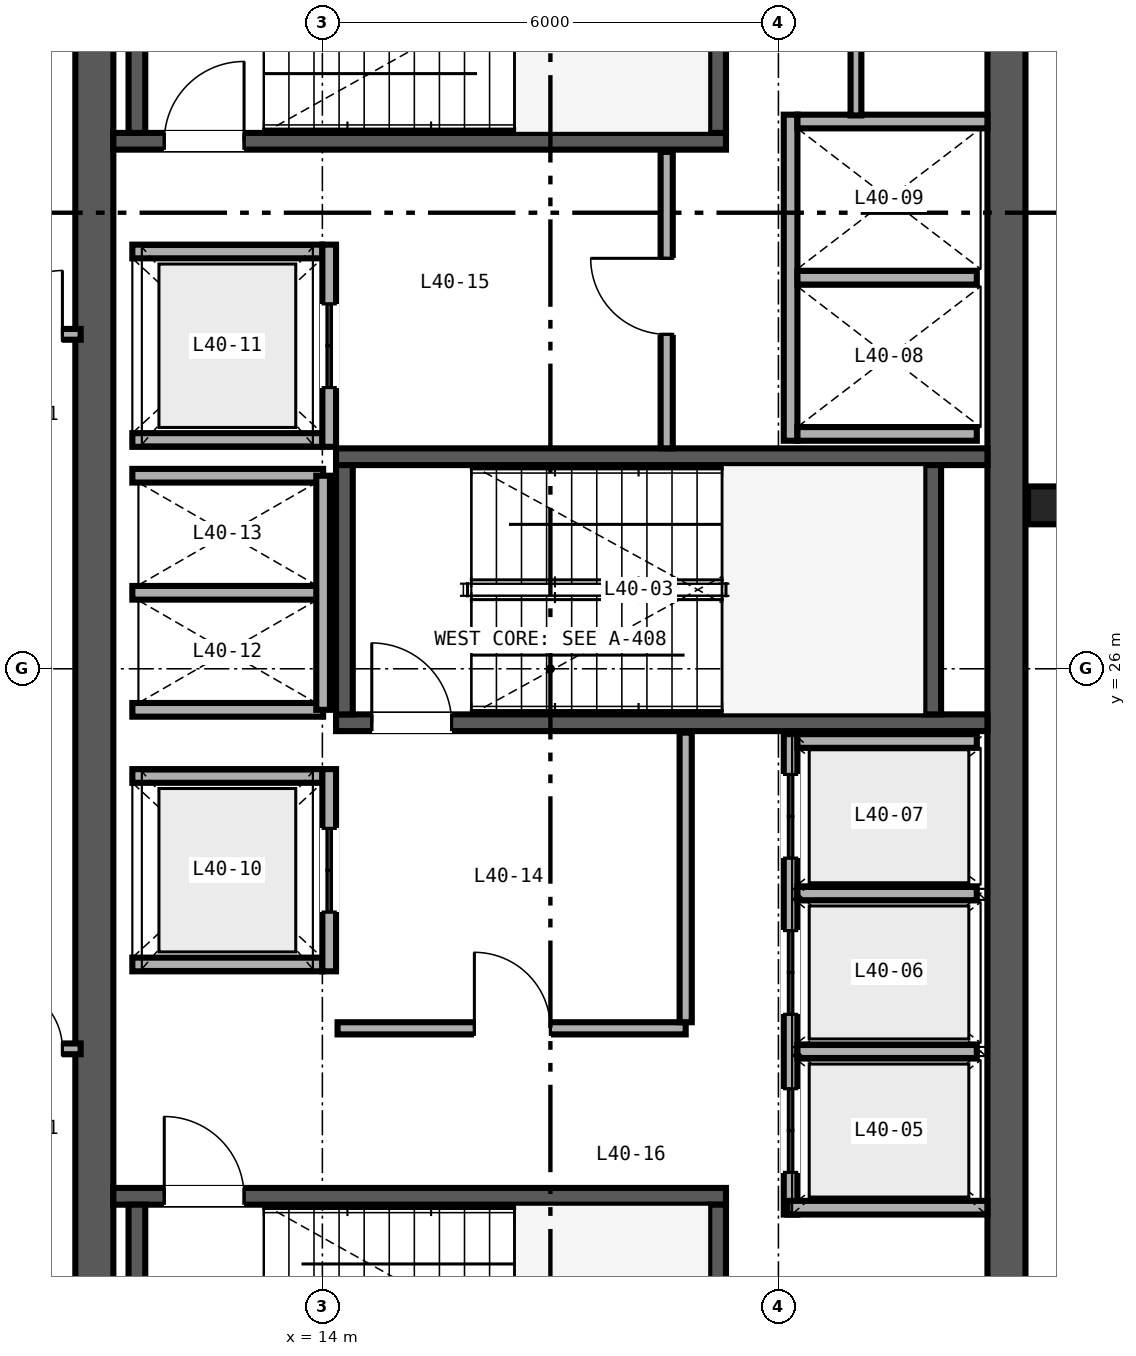
"""IFC4 building model, lengths in metres.
Left out: names, types, materials, properties, quantities, classifications, styles, units other than length and angle.
Written with IfcOpenShell. Run it as: python <this file> out.ifc"""

import sys

from ifc_helpers import new_model, si_unit, direction, frame, frame_2d, origin, origin_2d, place, context, subcontext, project, spatial, rectangle, i_section, extrude, source, transform, mapped, element, fill, save


model = new_model("IFC4")
c1 = context("Model", 3, precision=1e-05, world=origin(), true_north=direction((0.0, 1.0)))
c2 = subcontext(c1, "Body", "Model", "MODEL_VIEW")
j1 = project(units=[si_unit("LENGTHUNIT", "METRE"), si_unit("PLANEANGLEUNIT", "RADIAN")], contexts=[c1])
p1 = place(None, origin())
s1 = spatial("IfcSite", under=j1, at=p1, CompositionType="ELEMENT")
p2 = place(p1, origin())
s2 = spatial("IfcBuilding", under=s1, at=p2, CompositionType="ELEMENT")
p3 = place(p2, frame((0.0, 0.0, 163.2)))
s3 = spatial("IfcBuildingStorey", under=s2, at=p3, CompositionType="ELEMENT", Elevation=163.2)
for number, where, z_axis, x_axis in (
    (1, (11.0, 15.25, 0.0), (0.0, 0.0, 1.0), (0.0, 1.0, 0.0)),
    (2, (23.0, 15.25, 0.0), (0.0, 0.0, 1.0), (0.0, 1.0, 0.0)),
):
    element("IfcWall", number, at=place(p3, frame(where, z_axis=z_axis, x_axis=x_axis)), inside=s3, PredefinedType="SHEAR", context=c2, shape_type="SweptSolid", body=[
        extrude(rectangle(XDim=21.5, YDim=0.5, at=frame_2d((10.75, 0.0))), origin(), (0.0, 0.0, 1.0), 3.37),
    ])
p4 = place(p3, frame((11.25, 19.06, 0.0), z_axis=(0.0, 0.0, 1.0), x_axis=(1.0, 0.0, 0.0)))
e3 = element("IfcWall", 3, at=p4, inside=s3, PredefinedType="SHEAR", context=c2, shape_type="SweptSolid", body=[
    extrude(rectangle(XDim=8.06, YDim=0.22, at=frame_2d((4.03, 0.0))), origin(), (0.0, 0.0, 1.0), 3.4),
])
p5 = place(p4, frame((0.67, 0.0, 0.0)))
e4 = element("IfcOpeningElement", 4, at=p5, cuts=e3, PredefinedType="OPENING", context=c2, shape_type="SweptSolid", body=[
    extrude(rectangle(XDim=1.05, YDim=2.15, at=frame_2d((0.525, 1.075))), frame((0.0, 0.12, 0.0), z_axis=(0.0, -1.0, 0.0), x_axis=(1.0, 0.0, 0.0)), (0.0, 0.0, 1.0), 0.24),
])
for number, where, z_axis, x_axis in (
    (5, (11.56, 15.67, 0.0), (0.0, 0.0, 1.0), (0.0, 1.0, 0.0)),
    (6, (19.2, 15.67, 0.0), (0.0, 0.0, 1.0), (0.0, 1.0, 0.0)),
):
    element("IfcWall", number, at=place(p3, frame(where, z_axis=z_axis, x_axis=x_axis)), inside=s3, PredefinedType="SHEAR", context=c2, shape_type="SweptSolid", body=[
        extrude(rectangle(XDim=3.28, YDim=0.22, at=frame_2d((1.64, 0.0))), origin(), (0.0, 0.0, 1.0), 3.4),
    ])
p6 = place(p3, frame((11.25, 32.94, 0.0), z_axis=(0.0, 0.0, 1.0), x_axis=(1.0, 0.0, 0.0)))
e7 = element("IfcWall", 7, at=p6, inside=s3, PredefinedType="SHEAR", context=c2, shape_type="SweptSolid", body=[
    extrude(rectangle(XDim=8.06, YDim=0.22, at=frame_2d((4.03, 0.0))), origin(), (0.0, 0.0, 1.0), 3.4),
])
p7 = place(p6, frame((0.67, 0.0, 0.0)))
e8 = element("IfcOpeningElement", 8, at=p7, cuts=e7, PredefinedType="OPENING", context=c2, shape_type="SweptSolid", body=[
    extrude(rectangle(XDim=1.05, YDim=2.15, at=frame_2d((0.525, 1.075))), frame((0.0, 0.12, 0.0), z_axis=(0.0, -1.0, 0.0), x_axis=(1.0, 0.0, 0.0)), (0.0, 0.0, 1.0), 0.24),
])
for number, where, z_axis, x_axis in (
    (9, (11.56, 33.05, 0.0), (0.0, 0.0, 1.0), (0.0, 1.0, 0.0)),
    (10, (19.2, 33.05, 0.0), (0.0, 0.0, 1.0), (0.0, 1.0, 0.0)),
):
    element("IfcWall", number, at=place(p3, frame(where, z_axis=z_axis, x_axis=x_axis)), inside=s3, PredefinedType="SHEAR", context=c2, shape_type="SweptSolid", body=[
        extrude(rectangle(XDim=3.28, YDim=0.22, at=frame_2d((1.64, 0.0))), origin(), (0.0, 0.0, 1.0), 3.4),
    ])
p8 = place(p3, frame((14.18, 25.29, 0.0), z_axis=(0.0, 0.0, 1.0), x_axis=(1.0, 0.0, 0.0)))
e11 = element("IfcWall", 11, at=p8, inside=s3, PredefinedType="SHEAR", context=c2, shape_type="SweptSolid", body=[
    extrude(rectangle(XDim=8.57, YDim=0.22, at=frame_2d((4.285, 0.0))), origin(), (0.0, 0.0, 1.0), 3.4),
])
p9 = place(p8, frame((0.47, 0.0, 0.0)))
e12 = element("IfcOpeningElement", 12, at=p9, cuts=e11, PredefinedType="OPENING", context=c2, shape_type="SweptSolid", body=[
    extrude(rectangle(XDim=1.05, YDim=2.15, at=frame_2d((0.525, 1.075))), frame((0.0, 0.12, 0.0), z_axis=(0.0, -1.0, 0.0), x_axis=(1.0, 0.0, 0.0)), (0.0, 0.0, 1.0), 0.24),
])
p10 = place(p3, frame((14.18, 28.79, 0.0), z_axis=(0.0, 0.0, 1.0), x_axis=(1.0, 0.0, 0.0)))
e13 = element("IfcWall", 13, at=p10, inside=s3, PredefinedType="SHEAR", context=c2, shape_type="SweptSolid", body=[
    extrude(rectangle(XDim=8.57, YDim=0.22, at=frame_2d((4.285, 0.0))), origin(), (0.0, 0.0, 1.0), 3.4),
])
for number, where, z_axis, x_axis in (
    (14, (14.29, 25.4, 0.0), (0.0, 0.0, 1.0), (0.0, 1.0, 0.0)),
    (15, (22.03, 25.4, 0.0), (0.0, 0.0, 1.0), (0.0, 1.0, 0.0)),
):
    element("IfcWall", number, at=place(p3, frame(where, z_axis=z_axis, x_axis=x_axis)), inside=s3, PredefinedType="SHEAR", context=c2, shape_type="SweptSolid", body=[
        extrude(rectangle(XDim=3.28, YDim=0.22, at=frame_2d((1.64, 0.0))), origin(), (0.0, 0.0, 1.0), 3.4),
    ])
m1 = source(origin(), c2, "Body", "SweptSolid", [
    extrude(i_section(OverallWidth=0.432, OverallDepth=0.498, WebThickness=0.056, FlangeThickness=0.089, FilletRadius=0.025, at=origin_2d()), origin(), (0.0, 0.0, 1.0), 3.37),
])
p11 = place(p3, frame((23.5, 28.15, 0.0), z_axis=(0.0, 0.0, 1.0), x_axis=(1.0, 0.0, 0.0)))
e16 = element("IfcColumn", 16, at=p11, inside=s3, PredefinedType="COLUMN", context=c2, shape_type="MappedRepresentation", body=[
    mapped(m1, transform((0.0, 0.0, 0.0), scale=1.0)),
])
p12 = place(p3, frame((20.16, 18.82, 0.0), z_axis=(0.0, 0.0, 1.0), x_axis=(0.0, 1.0, 0.0)))
e17 = element("IfcWall", 17, at=p12, inside=s3, PredefinedType="SOLIDWALL", context=c2, shape_type="SweptSolid", body=[
    extrude(rectangle(XDim=6.32, YDim=0.18, at=frame_2d((3.16, 0.0))), origin(), (0.0, 0.0, 1.0), 2.47),
])
p13 = place(p12, frame((0.555, 0.0, 0.0)))
e18 = element("IfcOpeningElement", 18, at=p13, cuts=e17, PredefinedType="OPENING", context=c2, shape_type="SweptSolid", body=[
    extrude(rectangle(XDim=1.1, YDim=2.2, at=frame_2d((0.55, 1.1))), frame((0.0, 0.1, 0.0), z_axis=(0.0, -1.0, 0.0), x_axis=(1.0, 0.0, 0.0)), (0.0, 0.0, 1.0), 0.2),
])
p14 = place(p12, frame((2.635, 0.0, 0.0)))
e19 = element("IfcOpeningElement", 19, at=p14, cuts=e17, PredefinedType="OPENING", context=c2, shape_type="SweptSolid", body=[
    extrude(rectangle(XDim=1.1, YDim=2.2, at=frame_2d((0.55, 1.1))), frame((0.0, 0.1, 0.0), z_axis=(0.0, -1.0, 0.0), x_axis=(1.0, 0.0, 0.0)), (0.0, 0.0, 1.0), 0.2),
])
p15 = place(p12, frame((4.69, 0.0, 0.0)))
e20 = element("IfcOpeningElement", 20, at=p15, cuts=e17, PredefinedType="OPENING", context=c2, shape_type="SweptSolid", body=[
    extrude(rectangle(XDim=1.1, YDim=2.2, at=frame_2d((0.55, 1.1))), frame((0.0, 0.1, 0.0), z_axis=(0.0, -1.0, 0.0), x_axis=(1.0, 0.0, 0.0)), (0.0, 0.0, 1.0), 0.2),
])
p16 = place(p3, frame((20.12, 18.91, 0.0), z_axis=(0.0, 0.0, 1.0), x_axis=(1.0, 0.0, 0.0)))
e21 = element("IfcWall", 21, at=p16, inside=s3, PredefinedType="SOLIDWALL", context=c2, shape_type="SweptSolid", body=[
    extrude(rectangle(XDim=2.63, YDim=0.18, at=frame_2d((1.315, 0.0))), origin(), (0.0, 0.0, 1.0), 3.37),
])
p17 = place(p3, frame((20.25, 25.05, 0.0), z_axis=(0.0, 0.0, 1.0), x_axis=(1.0, 0.0, 0.0)))
e22 = element("IfcWall", 22, at=p17, inside=s3, PredefinedType="SOLIDWALL", context=c2, shape_type="SweptSolid", body=[
    extrude(rectangle(XDim=2.36, YDim=0.18, at=frame_2d((1.18, 0.0))), origin(), (0.0, 0.0, 1.0), 3.37),
])
p18 = place(p3, frame((20.25, 20.965, 0.0), z_axis=(0.0, 0.0, 1.0), x_axis=(1.0, 0.0, 0.0)))
e23 = element("IfcWall", 23, at=p18, inside=s3, PredefinedType="SOLIDWALL", context=c2, shape_type="SweptSolid", body=[
    extrude(rectangle(XDim=2.36, YDim=0.18, at=frame_2d((1.18, 0.0))), origin(), (0.0, 0.0, 1.0), 2.47),
])
p19 = place(p3, frame((20.25, 23.045, 0.0), z_axis=(0.0, 0.0, 1.0), x_axis=(1.0, 0.0, 0.0)))
e24 = element("IfcWall", 24, at=p19, inside=s3, PredefinedType="SOLIDWALL", context=c2, shape_type="SweptSolid", body=[
    extrude(rectangle(XDim=2.36, YDim=0.18, at=frame_2d((1.18, 0.0))), origin(), (0.0, 0.0, 1.0), 3.37),
])
p20 = place(p3, frame((20.16, 29.0, 0.0), z_axis=(0.0, 0.0, 1.0), x_axis=(0.0, 1.0, 0.0)))
e25 = element("IfcWall", 25, at=p20, inside=s3, PredefinedType="SOLIDWALL", context=c2, shape_type="SweptSolid", body=[
    extrude(rectangle(XDim=4.29, YDim=0.18, at=frame_2d((2.145, 0.0))), origin(), (0.0, 0.0, 1.0), 3.37),
])
p21 = place(p3, frame((20.25, 29.09, 0.0), z_axis=(0.0, 0.0, 1.0), x_axis=(1.0, 0.0, 0.0)))
e26 = element("IfcWall", 26, at=p21, inside=s3, PredefinedType="SOLIDWALL", context=c2, shape_type="SweptSolid", body=[
    extrude(rectangle(XDim=2.36, YDim=0.18, at=frame_2d((1.18, 0.0))), origin(), (0.0, 0.0, 1.0), 3.37),
])
p22 = place(p3, frame((20.25, 33.2, 0.0), z_axis=(0.0, 0.0, 1.0), x_axis=(1.0, 0.0, 0.0)))
e27 = element("IfcWall", 27, at=p22, inside=s3, PredefinedType="SOLIDWALL", context=c2, shape_type="SweptSolid", body=[
    extrude(rectangle(XDim=2.5, YDim=0.18, at=frame_2d((1.25, 0.0))), origin(), (0.0, 0.0, 1.0), 3.37),
])
p23 = place(p3, frame((20.25, 31.145, 0.0), z_axis=(0.0, 0.0, 1.0), x_axis=(1.0, 0.0, 0.0)))
e28 = element("IfcWall", 28, at=p23, inside=s3, PredefinedType="SOLIDWALL", context=c2, shape_type="SweptSolid", body=[
    extrude(rectangle(XDim=2.36, YDim=0.18, at=frame_2d((1.18, 0.0))), origin(), (0.0, 0.0, 1.0), 3.37),
])
for number, where, z_axis, x_axis in (
    (29, (11.5, 22.11, 0.0), (0.0, 0.0, 1.0), (1.0, 0.0, 0.0)),
    (30, (11.5, 24.59, 0.0), (0.0, 0.0, 1.0), (1.0, 0.0, 0.0)),
):
    element("IfcWall", number, at=place(p3, frame(where, z_axis=z_axis, x_axis=x_axis)), inside=s3, PredefinedType="SOLIDWALL", context=c2, shape_type="SweptSolid", body=[
        extrude(rectangle(XDim=2.5, YDim=0.18, at=frame_2d((1.25, 0.0))), origin(), (0.0, 0.0, 1.0), 3.37),
    ])
p24 = place(p3, frame((14.09, 22.02, 0.0), z_axis=(0.0, 0.0, 1.0), x_axis=(0.0, 1.0, 0.0)))
e31 = element("IfcWall", 31, at=p24, inside=s3, PredefinedType="SOLIDWALL", context=c2, shape_type="SweptSolid", body=[
    extrude(rectangle(XDim=2.66, YDim=0.18, at=frame_2d((1.33, 0.0))), origin(), (0.0, 0.0, 1.0), 3.37),
])
p25 = place(p24, frame((0.78, 0.0, 0.0)))
e32 = element("IfcOpeningElement", 32, at=p25, cuts=e31, PredefinedType="OPENING", context=c2, shape_type="SweptSolid", body=[
    extrude(rectangle(XDim=1.1, YDim=2.2, at=frame_2d((0.55, 1.1))), frame((0.0, 0.1, 0.0), z_axis=(0.0, -1.0, 0.0), x_axis=(1.0, 0.0, 0.0)), (0.0, 0.0, 1.0), 0.2),
])
for number, where, z_axis, x_axis in (
    (33, (11.5, 29.01, 0.0), (0.0, 0.0, 1.0), (1.0, 0.0, 0.0)),
    (34, (11.5, 31.49, 0.0), (0.0, 0.0, 1.0), (1.0, 0.0, 0.0)),
):
    element("IfcWall", number, at=place(p3, frame(where, z_axis=z_axis, x_axis=x_axis)), inside=s3, PredefinedType="SOLIDWALL", context=c2, shape_type="SweptSolid", body=[
        extrude(rectangle(XDim=2.5, YDim=0.18, at=frame_2d((1.25, 0.0))), origin(), (0.0, 0.0, 1.0), 3.37),
    ])
p26 = place(p3, frame((14.09, 28.92, 0.0), z_axis=(0.0, 0.0, 1.0), x_axis=(0.0, 1.0, 0.0)))
e35 = element("IfcWall", 35, at=p26, inside=s3, PredefinedType="SOLIDWALL", context=c2, shape_type="SweptSolid", body=[
    extrude(rectangle(XDim=2.66, YDim=0.18, at=frame_2d((1.33, 0.0))), origin(), (0.0, 0.0, 1.0), 3.37),
])
p27 = place(p26, frame((0.78, 0.0, 0.0)))
e36 = element("IfcOpeningElement", 36, at=p27, cuts=e35, PredefinedType="OPENING", context=c2, shape_type="SweptSolid", body=[
    extrude(rectangle(XDim=1.1, YDim=2.2, at=frame_2d((0.55, 1.1))), frame((0.0, 0.1, 0.0), z_axis=(0.0, -1.0, 0.0), x_axis=(1.0, 0.0, 0.0)), (0.0, 0.0, 1.0), 0.2),
])
for number, where, z_axis, x_axis in (
    (37, (11.5, 25.46, 0.0), (0.0, 0.0, 1.0), (1.0, 0.0, 0.0)),
    (38, (11.5, 27.0, 0.0), (0.0, 0.0, 1.0), (1.0, 0.0, 0.0)),
    (39, (11.5, 28.54, 0.0), (0.0, 0.0, 1.0), (1.0, 0.0, 0.0)),
):
    element("IfcWall", number, at=place(p3, frame(where, z_axis=z_axis, x_axis=x_axis)), inside=s3, PredefinedType="SOLIDWALL", context=c2, shape_type="SweptSolid", body=[
        extrude(rectangle(XDim=2.51, YDim=0.18, at=frame_2d((1.255, 0.0))), origin(), (0.0, 0.0, 1.0), 3.37),
    ])
p28 = place(p3, frame((14.01, 25.46, 0.0), z_axis=(0.0, 0.0, 1.0), x_axis=(0.0, 1.0, 0.0)))
e40 = element("IfcWall", 40, at=p28, inside=s3, PredefinedType="SOLIDWALL", context=c2, shape_type="SweptSolid", body=[
    extrude(rectangle(XDim=3.08, YDim=0.18, at=frame_2d((1.54, 0.0))), origin(), (0.0, 0.0, 1.0), 3.37),
])
p29 = place(p3, frame((14.2, 21.27, 0.0), z_axis=(0.0, 0.0, 1.0), x_axis=(1.0, 0.0, 0.0)))
e41 = element("IfcWall", 41, at=p29, inside=s3, PredefinedType="PARTITIONING", context=c2, shape_type="SweptSolid", body=[
    extrude(rectangle(XDim=4.58, YDim=0.16, at=frame_2d((2.29, 0.0))), origin(), (0.0, 0.0, 1.0), 3.37),
])
p30 = place(p29, frame((1.8, 0.0, 0.0)))
e42 = element("IfcOpeningElement", 42, at=p30, cuts=e41, PredefinedType="OPENING", context=c2, shape_type="SweptSolid", body=[
    extrude(rectangle(XDim=1.0, YDim=2.15, at=frame_2d((0.5, 1.075))), frame((0.0, 0.09, 0.0), z_axis=(0.0, -1.0, 0.0), x_axis=(1.0, 0.0, 0.0)), (0.0, 0.0, 1.0), 0.18),
])
p31 = place(p3, frame((18.78, 21.35, 0.0), z_axis=(0.0, 0.0, 1.0), x_axis=(0.0, 1.0, 0.0)))
e43 = element("IfcWall", 43, at=p31, inside=s3, PredefinedType="PARTITIONING", context=c2, shape_type="SweptSolid", body=[
    extrude(rectangle(XDim=3.81, YDim=0.16, at=frame_2d((1.905, 0.0))), origin(), (0.0, 0.0, 1.0), 3.37),
])
p32 = place(p3, frame((18.53, 28.9, 0.0), z_axis=(0.0, 0.0, 1.0), x_axis=(0.0, 1.0, 0.0)))
e44 = element("IfcWall", 44, at=p32, inside=s3, PredefinedType="PARTITIONING", context=c2, shape_type="SweptSolid", body=[
    extrude(rectangle(XDim=3.9, YDim=0.16, at=frame_2d((1.95, 0.0))), origin(), (0.0, 0.0, 1.0), 3.37),
])
p33 = place(p32, frame((1.5, 0.0, 0.0)))
e45 = element("IfcOpeningElement", 45, at=p33, cuts=e44, PredefinedType="OPENING", context=c2, shape_type="SweptSolid", body=[
    extrude(rectangle(XDim=1.0, YDim=2.15, at=frame_2d((0.5, 1.075))), frame((0.0, 0.09, 0.0), z_axis=(0.0, -1.0, 0.0), x_axis=(1.0, 0.0, 0.0)), (0.0, 0.0, 1.0), 0.18),
])
p34 = place(p3, frame((21.02, 33.28, 0.0), z_axis=(0.0, 0.0, 1.0), x_axis=(0.0, 1.0, 0.0)))
e46 = element("IfcWall", 46, at=p34, inside=s3, PredefinedType="PARTITIONING", context=c2, shape_type="SweptSolid", body=[
    extrude(rectangle(XDim=3.47, YDim=0.142, at=frame_2d((1.735, 0.0))), origin(), (0.0, 0.0, 1.0), 3.37),
])
p35 = place(p34, frame((1.15, 0.0, 0.0)))
e47 = element("IfcOpeningElement", 47, at=p35, cuts=e46, PredefinedType="OPENING", context=c2, shape_type="SweptSolid", body=[
    extrude(rectangle(XDim=0.84, YDim=2.1, at=frame_2d((0.42, 1.05))), frame((0.0, 0.081, 0.0), z_axis=(0.0, -1.0, 0.0), x_axis=(1.0, 0.0, 0.0)), (0.0, 0.0, 1.0), 0.162),
])
p36 = place(p3, frame((8.16, 21.0, 0.0), z_axis=(0.0, 0.0, 1.0), x_axis=(1.0, 0.0, 0.0)))
e48 = element("IfcWall", 48, at=p36, inside=s3, PredefinedType="PARTITIONING", context=c2, shape_type="SweptSolid", body=[
    extrude(rectangle(XDim=2.66, YDim=0.142, at=frame_2d((1.33, 0.0))), origin(), (0.0, 0.0, 1.0), 2.47),
])
p37 = place(p36, frame((1.58, 0.0, 0.0)))
e49 = element("IfcOpeningElement", 49, at=p37, cuts=e48, PredefinedType="OPENING", context=c2, shape_type="SweptSolid", body=[
    extrude(rectangle(XDim=0.84, YDim=2.1, at=frame_2d((0.42, 1.05))), frame((0.0, 0.081, 0.0), z_axis=(0.0, -1.0, 0.0), x_axis=(1.0, 0.0, 0.0)), (0.0, 0.0, 1.0), 0.162),
])
p38 = place(p3, frame((8.16, 30.4, 0.0), z_axis=(0.0, 0.0, 1.0), x_axis=(1.0, 0.0, 0.0)))
e50 = element("IfcWall", 50, at=p38, inside=s3, PredefinedType="PARTITIONING", context=c2, shape_type="SweptSolid", body=[
    extrude(rectangle(XDim=2.66, YDim=0.142, at=frame_2d((1.33, 0.0))), origin(), (0.0, 0.0, 1.0), 2.753),
])
p39 = place(p38, frame((1.58, 0.0, 0.0)))
e51 = element("IfcOpeningElement", 51, at=p39, cuts=e50, PredefinedType="OPENING", context=c2, shape_type="SweptSolid", body=[
    extrude(rectangle(XDim=0.84, YDim=2.1, at=frame_2d((0.42, 1.05))), frame((0.0, 0.081, 0.0), z_axis=(0.0, -1.0, 0.0), x_axis=(1.0, 0.0, 0.0)), (0.0, 0.0, 1.0), 0.162),
])
m2 = source(origin(), c2, "Body", "SweptSolid", [
    extrude(rectangle(XDim=1.05, YDim=2.15, at=frame_2d((0.525, 1.075))), frame((0.0, 0.025, 0.0), z_axis=(0.0, -1.0, 0.0), x_axis=(1.0, 0.0, 0.0)), (0.0, 0.0, 1.0), 0.05),
])
p40 = place(p5, origin())
e52 = element("IfcDoor", 52, at=p40, inside=s3, OperationType="SINGLE_SWING_LEFT", PredefinedType="DOOR", context=c2, shape_type="MappedRepresentation", body=[
    mapped(m2, transform((0.0, 0.0, 0.0), scale=1.0)),
])
fill(e4, e52)
p41 = place(p7, origin())
e53 = element("IfcDoor", 53, at=p41, inside=s3, OperationType="SINGLE_SWING_RIGHT", PredefinedType="DOOR", context=c2, shape_type="MappedRepresentation", body=[
    mapped(m2, transform((0.0, 0.0, 0.0), scale=1.0)),
])
fill(e8, e53)
p42 = place(p9, origin())
e54 = element("IfcDoor", 54, at=p42, inside=s3, OperationType="SINGLE_SWING_LEFT", PredefinedType="DOOR", context=c2, shape_type="MappedRepresentation", body=[
    mapped(m2, transform((0.0, 0.0, 0.0), scale=1.0)),
])
fill(e12, e54)
m3 = source(origin(), c2, "Body", "SweptSolid", [
    extrude(rectangle(XDim=1.1, YDim=2.2, at=frame_2d((0.55, 1.1))), frame((0.0, 0.025, 0.0), z_axis=(0.0, -1.0, 0.0), x_axis=(1.0, 0.0, 0.0)), (0.0, 0.0, 1.0), 0.05),
])
p43 = place(p13, origin())
e55 = element("IfcDoor", 55, at=p43, inside=s3, OperationType="DOUBLE_DOOR_SLIDING", PredefinedType="DOOR", context=c2, shape_type="MappedRepresentation", body=[
    mapped(m3, transform((0.0, 0.0, 0.0), scale=1.0)),
])
fill(e18, e55)
p44 = place(p14, origin())
e56 = element("IfcDoor", 56, at=p44, inside=s3, OperationType="DOUBLE_DOOR_SLIDING", PredefinedType="DOOR", context=c2, shape_type="MappedRepresentation", body=[
    mapped(m3, transform((0.0, 0.0, 0.0), scale=1.0)),
])
fill(e19, e56)
p45 = place(p15, origin())
e57 = element("IfcDoor", 57, at=p45, inside=s3, OperationType="DOUBLE_DOOR_SLIDING", PredefinedType="DOOR", context=c2, shape_type="MappedRepresentation", body=[
    mapped(m3, transform((0.0, 0.0, 0.0), scale=1.0)),
])
fill(e20, e57)
p46 = place(p25, origin())
e58 = element("IfcDoor", 58, at=p46, inside=s3, OperationType="DOUBLE_DOOR_SLIDING", PredefinedType="DOOR", context=c2, shape_type="MappedRepresentation", body=[
    mapped(m3, transform((0.0, 0.0, 0.0), scale=1.0)),
])
fill(e32, e58)
p47 = place(p27, origin())
e59 = element("IfcDoor", 59, at=p47, inside=s3, OperationType="DOUBLE_DOOR_SLIDING", PredefinedType="DOOR", context=c2, shape_type="MappedRepresentation", body=[
    mapped(m3, transform((0.0, 0.0, 0.0), scale=1.0)),
])
fill(e36, e59)
m4 = source(origin(), c2, "Body", "SweptSolid", [
    extrude(rectangle(XDim=1.0, YDim=2.15, at=frame_2d((0.5, 1.075))), frame((0.0, 0.025, 0.0), z_axis=(0.0, -1.0, 0.0), x_axis=(1.0, 0.0, 0.0)), (0.0, 0.0, 1.0), 0.05),
])
p48 = place(p30, origin())
e60 = element("IfcDoor", 60, at=p48, inside=s3, OperationType="SINGLE_SWING_LEFT", PredefinedType="DOOR", context=c2, shape_type="MappedRepresentation", body=[
    mapped(m4, transform((0.0, 0.0, 0.0), scale=1.0)),
])
fill(e42, e60)
p49 = place(p33, origin())
e61 = element("IfcDoor", 61, at=p49, inside=s3, OperationType="SINGLE_SWING_RIGHT", PredefinedType="DOOR", context=c2, shape_type="MappedRepresentation", body=[
    mapped(m4, transform((0.0, 0.0, 0.0), scale=1.0)),
])
fill(e45, e61)
m5 = source(origin(), c2, "Body", "SweptSolid", [
    extrude(rectangle(XDim=0.84, YDim=2.1, at=frame_2d((0.42, 1.05))), frame((0.0, 0.025, 0.0), z_axis=(0.0, -1.0, 0.0), x_axis=(1.0, 0.0, 0.0)), (0.0, 0.0, 1.0), 0.05),
])
p50 = place(p37, origin())
e62 = element("IfcDoor", 62, at=p50, inside=s3, OperationType="SINGLE_SWING_LEFT", PredefinedType="DOOR", context=c2, shape_type="MappedRepresentation", body=[
    mapped(m5, transform((0.0, 0.0, 0.0), scale=1.0)),
])
fill(e49, e62)
p51 = place(p39, origin())
e63 = element("IfcDoor", 63, at=p51, inside=s3, OperationType="SINGLE_SWING_RIGHT", PredefinedType="DOOR", context=c2, shape_type="MappedRepresentation", body=[
    mapped(m5, transform((0.0, 0.0, 0.0), scale=1.0)),
])
fill(e51, e63)
save(model, sys.argv[1])
